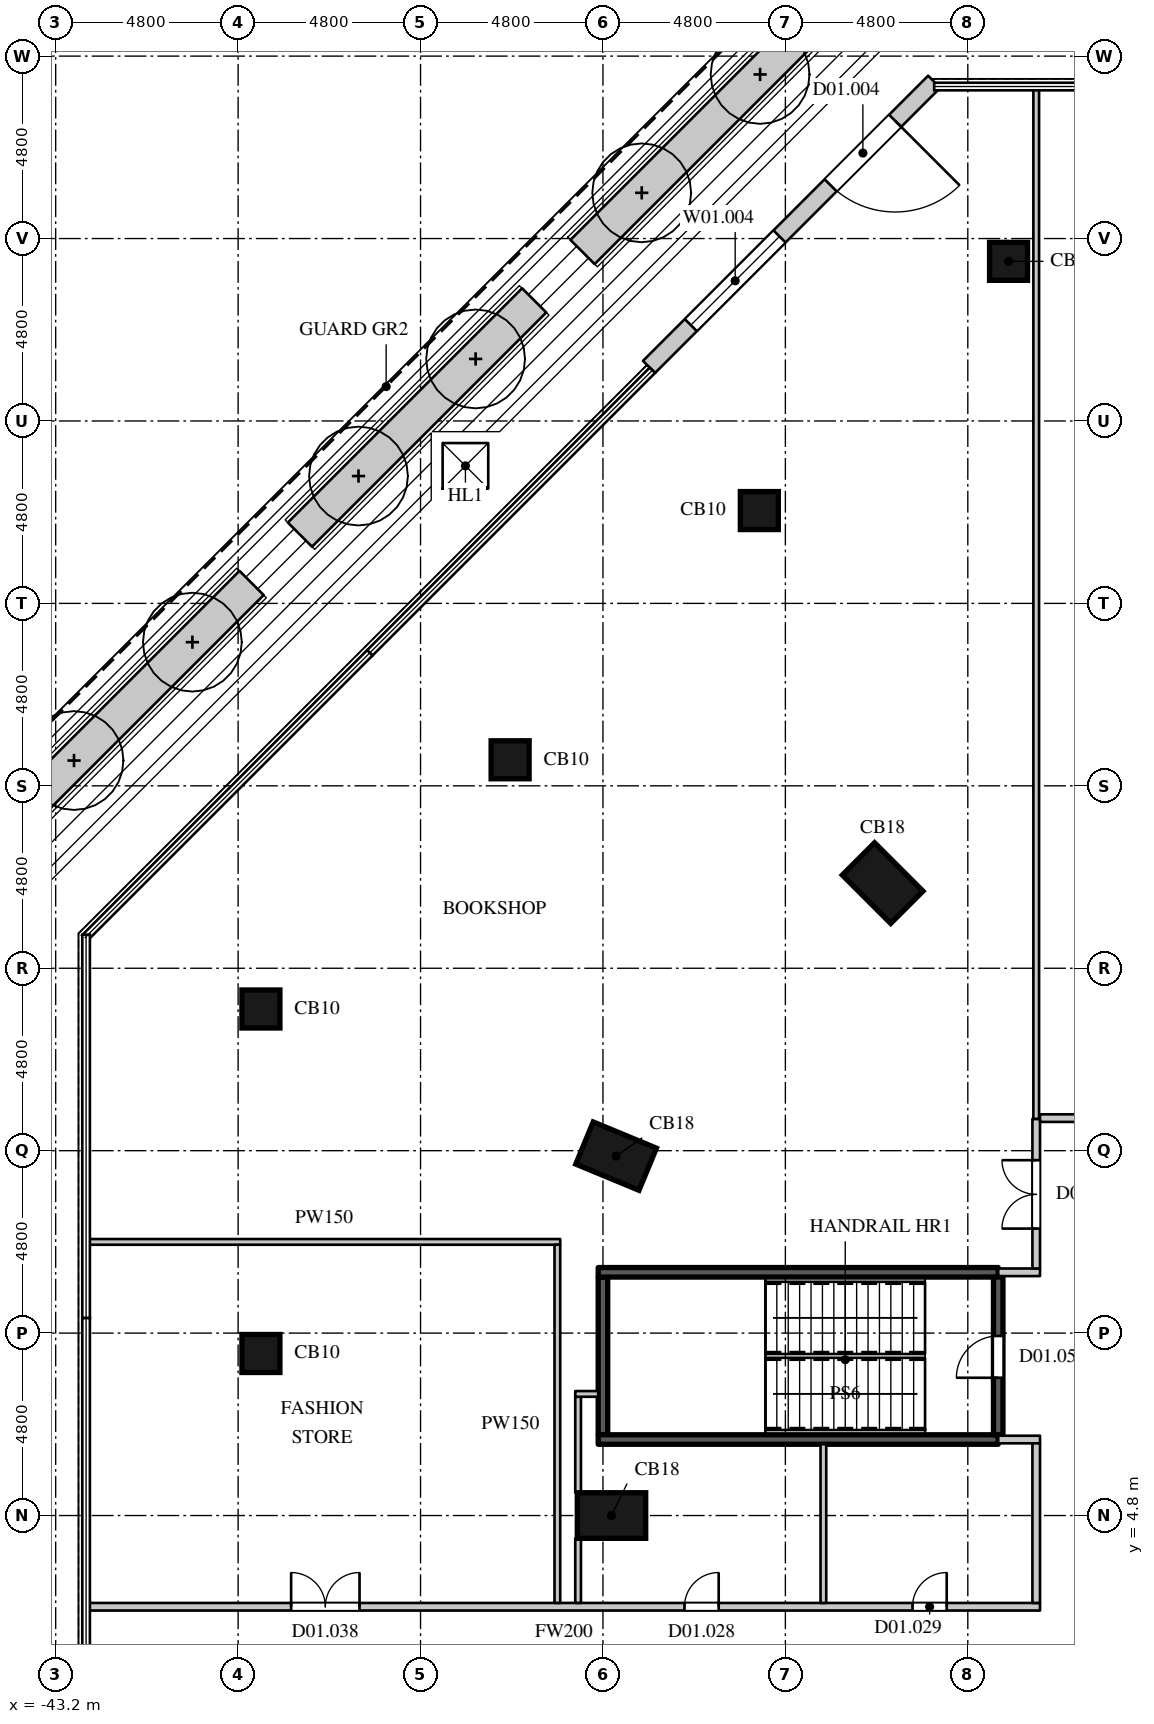
"""IFC4 building model, lengths in metres.
Left out: names, types, materials, properties, quantities, classifications, styles, units other than length and angle.
Written with IfcOpenShell. Run it as: python <this file> out.ifc"""

import sys

from ifc_helpers import new_model, si_unit, direction, frame, frame_2d, origin, origin_2d, place, context, subcontext, project, spatial, rectangle, extrude, element, fill, save


model = new_model("IFC4")
c1 = context("Model", 3, precision=1e-05, world=origin(), true_north=direction((0.0, 1.0)))
c2 = subcontext(c1, "Body", "Model", "MODEL_VIEW")
j1 = project(units=[si_unit("LENGTHUNIT", "METRE"), si_unit("PLANEANGLEUNIT", "RADIAN")], contexts=[c1])
p1 = place(None, origin())
s1 = spatial("IfcSite", under=j1, at=p1, CompositionType="ELEMENT")
p2 = place(p1, origin())
s2 = spatial("IfcBuilding", under=s1, at=p2, CompositionType="ELEMENT")
p3 = place(p2, frame((0.0, 0.0, 6.0)))
s3 = spatial("IfcBuildingStorey", under=s2, at=p3, CompositionType="ELEMENT", Elevation=6.0)
p4 = place(p3, frame((-28.575, 4.8, 0.0), z_axis=(0.0, 0.0, 1.0), x_axis=(0.0, -1.0, 0.0)))
e1 = element("IfcColumn", 1, at=p4, inside=s3, PredefinedType="COLUMN", context=c2, shape_type="SweptSolid", body=[
    extrude(rectangle(XDim=1.2, YDim=1.8, at=origin_2d()), origin(), (0.0, 0.0, 1.0), 5.0),
])
p5 = place(p3, frame((-37.8, 9.064, 0.0), z_axis=(0.0, 0.0, 1.0), x_axis=(1.0, 0.0, 0.0)))
e2 = element("IfcColumn", 2, at=p5, inside=s3, PredefinedType="COLUMN", context=c2, shape_type="SweptSolid", body=[
    extrude(rectangle(XDim=1.0, YDim=1.0, at=origin_2d()), origin(), (0.0, 0.0, 1.0), 5.0),
])
p6 = place(p3, frame((-28.454, 14.257, 0.0), z_axis=(0.0, 0.0, 1.0), x_axis=(-0.382683496864, -0.923879505795, 0.0)))
e3 = element("IfcColumn", 3, at=p6, inside=s3, PredefinedType="COLUMN", context=c2, shape_type="SweptSolid", body=[
    extrude(rectangle(XDim=1.2, YDim=1.8, at=origin_2d()), origin(), (0.0, 0.0, 1.0), 5.0),
])
p7 = place(p3, frame((-37.8, 18.128, 0.0), z_axis=(0.0, 0.0, 1.0), x_axis=(1.0, 0.0, 0.0)))
e4 = element("IfcColumn", 4, at=p7, inside=s3, PredefinedType="COLUMN", context=c2, shape_type="SweptSolid", body=[
    extrude(rectangle(XDim=1.0, YDim=1.0, at=origin_2d()), origin(), (0.0, 0.0, 1.0), 5.0),
])
p8 = place(p3, frame((-21.441, 21.441, 0.0), z_axis=(0.0, 0.0, 1.0), x_axis=(-0.707106781187, -0.707106781187, 0.0)))
e5 = element("IfcColumn", 5, at=p8, inside=s3, PredefinedType="COLUMN", context=c2, shape_type="SweptSolid", body=[
    extrude(rectangle(XDim=1.2, YDim=1.8, at=origin_2d()), origin(), (0.0, 0.0, 1.0), 5.0),
])
for number, where, z_axis, x_axis in (
    (6, (-31.243, 24.685, 0.0), (0.0, 0.0, 1.0), (1.0, 0.0, 0.0)),
    (7, (-24.685, 31.243, 0.0), (0.0, 0.0, 1.0), (1.0, 0.0, 0.0)),
    (8, (-18.128, 37.8, 0.0), (0.0, 0.0, 1.0), (1.0, 0.0, 0.0)),
):
    element("IfcColumn", number, at=place(p3, frame(where, z_axis=z_axis, x_axis=x_axis)), inside=s3, PredefinedType="COLUMN", context=c2, shape_type="SweptSolid", body=[
        extrude(rectangle(XDim=1.0, YDim=1.0, at=origin_2d()), origin(), (0.0, 0.0, 1.0), 5.0),
    ])
p9 = place(p3, frame((-20.085, 42.525, 0.0), z_axis=(0.0, 0.0, 1.0), x_axis=(-0.707106781187, -0.707106781187, 0.0)))
e9 = element("IfcWall", 9, at=p9, inside=s3, PredefinedType="ELEMENTEDWALL", context=c2, shape_type="SweptSolid", body=[
    extrude(rectangle(XDim=10.609, YDim=0.45, at=frame_2d((5.305, 0.0))), origin(), (0.0, 0.0, 1.0), 4.7),
])
p10 = place(p9, frame((1.452, 0.0, 0.0)))
e10 = element("IfcOpeningElement", 10, at=p10, cuts=e9, PredefinedType="OPENING", context=c2, shape_type="SweptSolid", body=[
    extrude(rectangle(XDim=2.4, YDim=2.7, at=frame_2d((1.2, 1.35))), frame((0.0, 0.235, 0.0), z_axis=(0.0, -1.0, 0.0), x_axis=(1.0, 0.0, 0.0)), (0.0, 0.0, 1.0), 0.47),
])
p11 = place(p9, frame((5.755, 0.0, 1.05)))
e11 = element("IfcOpeningElement", 11, at=p11, cuts=e9, PredefinedType="OPENING", context=c2, shape_type="SweptSolid", body=[
    extrude(rectangle(XDim=3.3, YDim=2.7, at=frame_2d((1.65, 1.35))), frame((0.0, 0.235, 0.0), z_axis=(0.0, -1.0, 0.0), x_axis=(1.0, 0.0, 0.0)), (0.0, 0.0, 1.0), 0.47),
])
p12 = place(p3, frame((-23.108, 44.275, 0.0), z_axis=(0.0, 0.0, 1.0), x_axis=(-0.707106781187, -0.707106781187, 0.0)))
e12 = element("IfcWall", 12, at=p12, inside=s3, PredefinedType="USERDEFINED", context=c2, shape_type="SweptSolid", body=[
    extrude(rectangle(XDim=8.81, YDim=0.9, at=frame_2d((4.405, 0.0))), origin(), (0.0, 0.0, 1.0), 0.9),
])
p13 = place(p3, frame((-30.61, 36.773, 0.0), z_axis=(0.0, 0.0, 1.0), x_axis=(-0.707106781187, -0.707106781187, 0.0)))
e13 = element("IfcWall", 13, at=p13, inside=s3, PredefinedType="USERDEFINED", context=c2, shape_type="SweptSolid", body=[
    extrude(rectangle(XDim=8.716, YDim=0.9, at=frame_2d((4.358, 0.0))), origin(), (0.0, 0.0, 1.0), 0.9),
])
p14 = place(p3, frame((-38.046, 29.337, 0.0), z_axis=(0.0, 0.0, 1.0), x_axis=(-0.707106781187, -0.707106781187, 0.0)))
e14 = element("IfcWall", 14, at=p14, inside=s3, PredefinedType="USERDEFINED", context=c2, shape_type="SweptSolid", body=[
    extrude(rectangle(XDim=8.81, YDim=0.9, at=frame_2d((4.405, 0.0))), origin(), (0.0, 0.0, 1.0), 0.9),
])
p15 = place(p3, frame((-42.355, 2.4, 0.0), z_axis=(0.0, 0.0, 1.0), x_axis=(1.0, 0.0, 0.0)))
e15 = element("IfcWall", 15, at=p15, inside=s3, PredefinedType="PARTITIONING", context=c2, shape_type="SweptSolid", body=[
    extrude(rectangle(XDim=25.055, YDim=0.2, at=frame_2d((12.527, 0.0))), origin(), (0.0, 0.0, 1.0), 4.4),
])
p16 = place(p15, frame((15.7, 0.0, 0.0)))
e16 = element("IfcOpeningElement", 16, at=p16, cuts=e15, PredefinedType="OPENING", context=c2, shape_type="SweptSolid", body=[
    extrude(rectangle(XDim=0.9, YDim=2.2, at=frame_2d((0.45, 1.1))), frame((0.0, 0.11, 0.0), z_axis=(0.0, -1.0, 0.0), x_axis=(1.0, 0.0, 0.0)), (0.0, 0.0, 1.0), 0.22),
])
p17 = place(p15, frame((21.7, 0.0, 0.0)))
e17 = element("IfcOpeningElement", 17, at=p17, cuts=e15, PredefinedType="OPENING", context=c2, shape_type="SweptSolid", body=[
    extrude(rectangle(XDim=0.9, YDim=2.2, at=frame_2d((0.45, 1.1))), frame((0.0, 0.11, 0.0), z_axis=(0.0, -1.0, 0.0), x_axis=(1.0, 0.0, 0.0)), (0.0, 0.0, 1.0), 0.22),
])
p18 = place(p15, frame((5.35, 0.0, 0.0)))
e18 = element("IfcOpeningElement", 18, at=p18, cuts=e15, PredefinedType="OPENING", context=c2, shape_type="SweptSolid", body=[
    extrude(rectangle(XDim=1.8, YDim=2.4, at=frame_2d((0.9, 1.2))), frame((0.0, 0.11, 0.0), z_axis=(0.0, -1.0, 0.0), x_axis=(1.0, 0.0, 0.0)), (0.0, 0.0, 1.0), 0.22),
])
for number, where, z_axis, x_axis in (
    (19, (-18.4, 6.8, 0.0), (0.0, 0.0, 1.0), (1.0, 0.0, 0.0)),
    (20, (-18.4, 11.2, 0.0), (0.0, 0.0, 1.0), (1.0, 0.0, 0.0)),
):
    element("IfcWall", number, at=place(p3, frame(where, z_axis=z_axis, x_axis=x_axis)), inside=s3, PredefinedType="PARTITIONING", context=c2, shape_type="SweptSolid", body=[
        extrude(rectangle(XDim=1.1, YDim=0.2, at=frame_2d((0.55, 0.0))), origin(), (0.0, 0.0, 1.0), 4.4),
    ])
p19 = place(p3, frame((-17.4, 2.5, 0.0), z_axis=(0.0, 0.0, 1.0), x_axis=(0.0, 1.0, 0.0)))
e21 = element("IfcWall", 21, at=p19, inside=s3, PredefinedType="PARTITIONING", context=c2, shape_type="SweptSolid", body=[
    extrude(rectangle(XDim=4.2, YDim=0.2, at=frame_2d((2.1, 0.0))), origin(), (0.0, 0.0, 1.0), 4.4),
])
p20 = place(p3, frame((-17.4, 11.3, 0.0), z_axis=(0.0, 0.0, 1.0), x_axis=(0.0, 1.0, 0.0)))
e22 = element("IfcWall", 22, at=p20, inside=s3, PredefinedType="PARTITIONING", context=c2, shape_type="SweptSolid", body=[
    extrude(rectangle(XDim=3.937, YDim=0.2, at=frame_2d((1.968, 0.0))), origin(), (0.0, 0.0, 1.0), 4.4),
])
p21 = place(p20, frame((1.05, 0.0, 0.0)))
e23 = element("IfcOpeningElement", 23, at=p21, cuts=e22, PredefinedType="OPENING", context=c2, shape_type="SweptSolid", body=[
    extrude(rectangle(XDim=1.8, YDim=2.4, at=frame_2d((0.9, 1.2))), frame((0.0, 0.11, 0.0), z_axis=(0.0, -1.0, 0.0), x_axis=(1.0, 0.0, 0.0)), (0.0, 0.0, 1.0), 0.22),
])
p22 = place(p3, frame((-17.3, 15.257, 0.0), z_axis=(0.0, 0.0, 1.0), x_axis=(1.0, 0.0, 0.0)))
e24 = element("IfcWall", 24, at=p22, inside=s3, PredefinedType="PARTITIONING", context=c2, shape_type="SweptSolid", body=[
    extrude(rectangle(XDim=6.2, YDim=0.2, at=frame_2d((3.1, 0.0))), origin(), (0.0, 0.0, 1.0), 4.4),
])
p23 = place(p22, frame((2.3, 0.0, 0.0)))
e25 = element("IfcOpeningElement", 25, at=p23, cuts=e24, PredefinedType="OPENING", context=c2, shape_type="SweptSolid", body=[
    extrude(rectangle(XDim=1.6, YDim=2.4, at=frame_2d((0.8, 1.2))), frame((0.0, 0.11, 0.0), z_axis=(0.0, -1.0, 0.0), x_axis=(1.0, 0.0, 0.0)), (0.0, 0.0, 1.0), 0.22),
])
p24 = place(p3, frame((-42.355, 12.0, 0.0), z_axis=(0.0, 0.0, 1.0), x_axis=(1.0, 0.0, 0.0)))
e26 = element("IfcWall", 26, at=p24, inside=s3, PredefinedType="PARTITIONING", context=c2, shape_type="SweptSolid", body=[
    extrude(rectangle(XDim=12.43, YDim=0.15, at=frame_2d((6.215, 0.0))), origin(), (0.0, 0.0, 1.0), 4.4),
])
p25 = place(p3, frame((-30.0, 2.5, 0.0), z_axis=(0.0, 0.0, 1.0), x_axis=(0.0, 1.0, 0.0)))
e27 = element("IfcWall", 27, at=p25, inside=s3, PredefinedType="PARTITIONING", context=c2, shape_type="SweptSolid", body=[
    extrude(rectangle(XDim=9.425, YDim=0.15, at=frame_2d((4.712, 0.0))), origin(), (0.0, 0.0, 1.0), 4.4),
])
p26 = place(p3, frame((-29.454, 2.5, 0.0), z_axis=(0.0, 0.0, 1.0), x_axis=(0.0, 1.0, 0.0)))
e28 = element("IfcWall", 28, at=p26, inside=s3, PredefinedType="PARTITIONING", context=c2, shape_type="SweptSolid", body=[
    extrude(rectangle(XDim=1.7, YDim=0.15, at=frame_2d((0.85, 0.0))), origin(), (0.0, 0.0, 1.0), 4.4),
])
p27 = place(p3, frame((-29.454, 5.4, 0.0), z_axis=(0.0, 0.0, 1.0), x_axis=(0.0, 1.0, 0.0)))
e29 = element("IfcWall", 29, at=p27, inside=s3, PredefinedType="PARTITIONING", context=c2, shape_type="SweptSolid", body=[
    extrude(rectangle(XDim=2.525, YDim=0.15, at=frame_2d((1.263, 0.0))), origin(), (0.0, 0.0, 1.0), 4.4),
])
p28 = place(p3, frame((-29.529, 8.0, 0.0), z_axis=(0.0, 0.0, 1.0), x_axis=(1.0, 0.0, 0.0)))
e30 = element("IfcWall", 30, at=p28, inside=s3, PredefinedType="PARTITIONING", context=c2, shape_type="SweptSolid", body=[
    extrude(rectangle(XDim=0.604, YDim=0.15, at=frame_2d((0.302, 0.0))), origin(), (0.0, 0.0, 1.0), 4.4),
])
p29 = place(p3, frame((-23.0, 2.5, 0.0), z_axis=(0.0, 0.0, 1.0), x_axis=(0.0, 1.0, 0.0)))
e31 = element("IfcWall", 31, at=p29, inside=s3, PredefinedType="PARTITIONING", context=c2, shape_type="SweptSolid", body=[
    extrude(rectangle(XDim=4.175, YDim=0.15, at=frame_2d((2.087, 0.0))), origin(), (0.0, 0.0, 1.0), 4.4),
])
p30 = place(p3, frame((-17.4, 15.237, 0.0), z_axis=(0.0, 0.0, 1.0), x_axis=(0.0, 1.0, 0.0)))
e32 = element("IfcWall", 32, at=p30, inside=s3, PredefinedType="PARTITIONING", context=c2, shape_type="SweptSolid", body=[
    extrude(rectangle(XDim=27.118, YDim=0.15, at=frame_2d((13.559, 0.0))), origin(), (0.0, 0.0, 1.0), 4.4),
])
p31 = place(p3, frame((-28.8, 6.925, 0.0), z_axis=(0.0, 0.0, 1.0), x_axis=(0.0, 1.0, 0.0)))
e33 = element("IfcWall", 33, at=p31, inside=s3, PredefinedType="SHEAR", context=c2, shape_type="SweptSolid", body=[
    extrude(rectangle(XDim=4.15, YDim=0.25, at=frame_2d((2.075, 0.0))), origin(), (0.0, 0.0, 1.0), 4.65),
])
for number, where, z_axis, x_axis in (
    (34, (-28.925, 6.8, 0.0), (0.0, 0.0, 1.0), (1.0, 0.0, 0.0)),
    (35, (-28.925, 11.2, 0.0), (0.0, 0.0, 1.0), (1.0, 0.0, 0.0)),
):
    element("IfcWall", number, at=place(p3, frame(where, z_axis=z_axis, x_axis=x_axis)), inside=s3, PredefinedType="SHEAR", context=c2, shape_type="SweptSolid", body=[
        extrude(rectangle(XDim=10.525, YDim=0.25, at=frame_2d((5.263, 0.0))), origin(), (0.0, 0.0, 1.0), 4.65),
    ])
p32 = place(p3, frame((-18.4, 6.925, 0.0), z_axis=(0.0, 0.0, 1.0), x_axis=(0.0, 1.0, 0.0)))
e36 = element("IfcWall", 36, at=p32, inside=s3, PredefinedType="SHEAR", context=c2, shape_type="SweptSolid", body=[
    extrude(rectangle(XDim=4.15, YDim=0.25, at=frame_2d((2.075, 0.0))), origin(), (0.0, 0.0, 1.0), 4.65),
])
p33 = place(p32, frame((1.5, 0.0, 0.0)))
e37 = element("IfcOpeningElement", 37, at=p33, cuts=e36, PredefinedType="OPENING", context=c2, shape_type="SweptSolid", body=[
    extrude(rectangle(XDim=1.1, YDim=2.2, at=frame_2d((0.55, 1.1))), frame((0.0, 0.135, 0.0), z_axis=(0.0, -1.0, 0.0), x_axis=(1.0, 0.0, 0.0)), (0.0, 0.0, 1.0), 0.27),
])
p34 = place(p10, origin())
e38 = element("IfcDoor", 38, at=p34, inside=s3, OperationType="SINGLE_SWING_LEFT", PredefinedType="DOOR", context=c2, shape_type="SweptSolid", body=[
    extrude(rectangle(XDim=2.4, YDim=2.7, at=frame_2d((1.2, 1.35))), frame((0.0, 0.13, 0.0), z_axis=(0.0, -1.0, 0.0), x_axis=(1.0, 0.0, 0.0)), (0.0, 0.0, 1.0), 0.05),
])
fill(e10, e38)
p35 = place(p11, origin())
e39 = element("IfcWindow", 39, at=p35, inside=s3, PartitioningType="SINGLE_PANEL", PredefinedType="WINDOW", context=c2, shape_type="SweptSolid", body=[
    extrude(rectangle(XDim=3.3, YDim=2.7, at=frame_2d((1.65, 1.35))), frame((0.0, 0.135, 0.0), z_axis=(0.0, -1.0, 0.0), x_axis=(1.0, 0.0, 0.0)), (0.0, 0.0, 1.0), 0.06),
])
fill(e11, e39)
p36 = place(p3, frame((0.0, 0.0, -0.35)))
p37 = place(p36, frame((-32.419, 32.419, 0.0)))
p38 = place(p37, frame((0.0, 0.0, 0.3)))
e40 = element("IfcWindow", 40, at=p38, inside=s3, PartitioningType="SINGLE_PANEL", PredefinedType="SKYLIGHT", context=c2, shape_type="SweptSolid", body=[
    extrude(rectangle(XDim=1.2, YDim=1.2, at=origin_2d()), origin(), (0.0, 0.0, 1.0), 0.05),
])
p39 = place(p16, origin())
e41 = element("IfcDoor", 41, at=p39, inside=s3, OperationType="SINGLE_SWING_RIGHT", PredefinedType="DOOR", context=c2, shape_type="SweptSolid", body=[
    extrude(rectangle(XDim=0.9, YDim=2.2, at=frame_2d((0.45, 1.1))), frame((0.0, 0.025, 0.0), z_axis=(0.0, -1.0, 0.0), x_axis=(1.0, 0.0, 0.0)), (0.0, 0.0, 1.0), 0.05),
])
fill(e16, e41)
p40 = place(p17, origin())
e42 = element("IfcDoor", 42, at=p40, inside=s3, OperationType="SINGLE_SWING_RIGHT", PredefinedType="DOOR", context=c2, shape_type="SweptSolid", body=[
    extrude(rectangle(XDim=0.9, YDim=2.2, at=frame_2d((0.45, 1.1))), frame((0.0, 0.025, 0.0), z_axis=(0.0, -1.0, 0.0), x_axis=(1.0, 0.0, 0.0)), (0.0, 0.0, 1.0), 0.05),
])
fill(e17, e42)
p41 = place(p18, origin())
e43 = element("IfcDoor", 43, at=p41, inside=s3, OperationType="DOUBLE_DOOR_SINGLE_SWING", PredefinedType="DOOR", context=c2, shape_type="SweptSolid", body=[
    extrude(rectangle(XDim=1.8, YDim=2.4, at=frame_2d((0.9, 1.2))), frame((0.0, 0.025, 0.0), z_axis=(0.0, -1.0, 0.0), x_axis=(1.0, 0.0, 0.0)), (0.0, 0.0, 1.0), 0.05),
])
fill(e18, e43)
p42 = place(p21, origin())
e44 = element("IfcDoor", 44, at=p42, inside=s3, OperationType="DOUBLE_DOOR_SINGLE_SWING", PredefinedType="DOOR", context=c2, shape_type="SweptSolid", body=[
    extrude(rectangle(XDim=1.8, YDim=2.4, at=frame_2d((0.9, 1.2))), frame((0.0, 0.025, 0.0), z_axis=(0.0, -1.0, 0.0), x_axis=(1.0, 0.0, 0.0)), (0.0, 0.0, 1.0), 0.05),
])
fill(e23, e44)
p43 = place(p33, origin())
e45 = element("IfcDoor", 45, at=p43, inside=s3, OperationType="SINGLE_SWING_LEFT", PredefinedType="DOOR", context=c2, shape_type="SweptSolid", body=[
    extrude(rectangle(XDim=1.1, YDim=2.2, at=frame_2d((0.55, 1.1))), frame((0.0, 0.025, 0.0), z_axis=(0.0, -1.0, 0.0), x_axis=(1.0, 0.0, 0.0)), (0.0, 0.0, 1.0), 0.05),
])
fill(e37, e45)
save(model, sys.argv[1])
